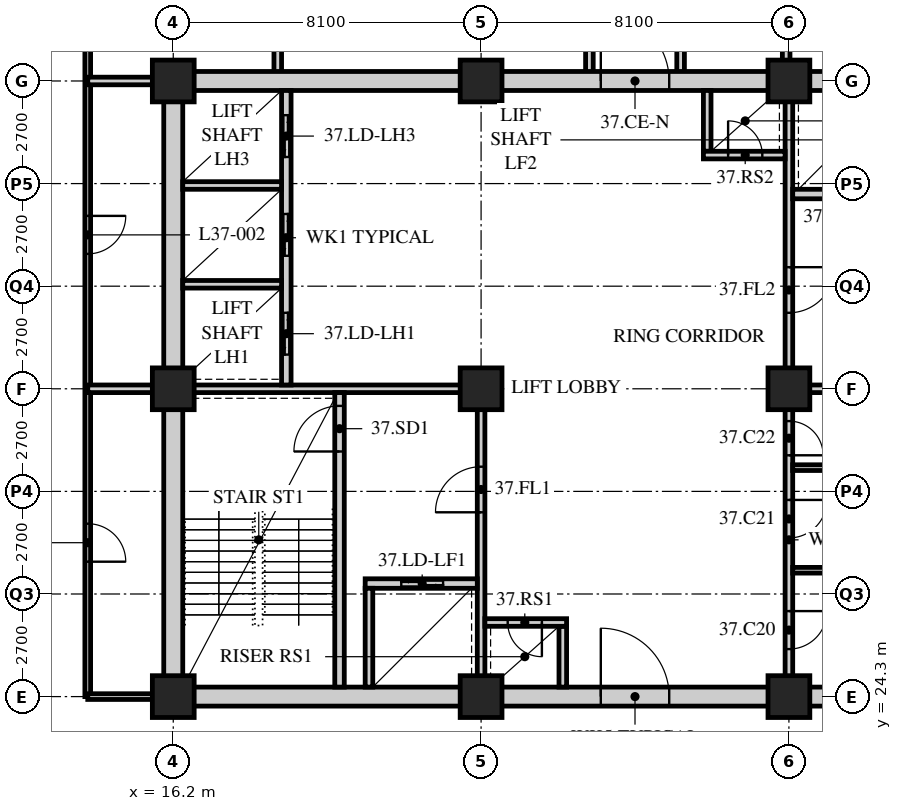
"""IFC4 building model, lengths in metres.
Left out: names, types, materials, properties, quantities, classifications, styles, units other than length and angle.
Written with IfcOpenShell. Run it as: python <this file> out.ifc"""

import sys

from ifc_helpers import new_model, si_unit, direction, frame, frame_2d, origin, origin_2d, place, context, subcontext, project, spatial, rectangle, hollow_rectangle, extrude, element, fill, save


model = new_model("IFC4")
c1 = context("Model", 3, precision=1e-05, world=origin(), true_north=direction((0.0, 1.0)))
c2 = subcontext(c1, "Body", "Model", "MODEL_VIEW")
j1 = project(units=[si_unit("LENGTHUNIT", "METRE"), si_unit("PLANEANGLEUNIT", "RADIAN")], contexts=[c1])
p1 = place(None, origin())
s1 = spatial("IfcSite", under=j1, at=p1, CompositionType="ELEMENT")
p2 = place(p1, origin())
s2 = spatial("IfcBuilding", under=s1, at=p2, CompositionType="ELEMENT")
p3 = place(p2, frame((0.0, 0.0, 144.2)))
s3 = spatial("IfcBuildingStorey", under=s2, at=p3, CompositionType="ELEMENT", Elevation=144.2)
for number, where, z_axis, x_axis in (
    (1, (16.2, 24.3, 0.0), (0.0, 0.0, 1.0), (1.0, 0.0, 0.0)),
    (2, (16.2, 32.4, 0.0), (0.0, 0.0, 1.0), (1.0, 0.0, 0.0)),
    (3, (16.2, 40.5, 0.0), (0.0, 0.0, 1.0), (1.0, 0.0, 0.0)),
    (4, (24.3, 24.3, 0.0), (0.0, 0.0, 1.0), (1.0, 0.0, 0.0)),
    (5, (24.3, 32.4, 0.0), (0.0, 0.0, 1.0), (1.0, 0.0, 0.0)),
    (6, (24.3, 40.5, 0.0), (0.0, 0.0, 1.0), (1.0, 0.0, 0.0)),
    (7, (32.4, 24.3, 0.0), (0.0, 0.0, 1.0), (1.0, 0.0, 0.0)),
    (8, (32.4, 32.4, 0.0), (0.0, 0.0, 1.0), (1.0, 0.0, 0.0)),
    (9, (32.4, 40.5, 0.0), (0.0, 0.0, 1.0), (1.0, 0.0, 0.0)),
):
    element("IfcColumn", number, at=place(p3, frame(where, z_axis=z_axis, x_axis=x_axis)), inside=s3, PredefinedType="COLUMN", context=c2, shape_type="SweptSolid", body=[
        extrude(hollow_rectangle(XDim=1.1, YDim=1.1, WallThickness=0.1, at=origin_2d()), origin(), (0.0, 0.0, 1.0), 3.4),
    ])
p4 = place(p3, frame((13.95, 44.1, 0.0), z_axis=(0.0, 0.0, 1.0), x_axis=(0.0, -1.0, 0.0)))
e10 = element("IfcWall", 10, at=p4, inside=s3, PredefinedType="PARTITIONING", context=c2, shape_type="SweptSolid", body=[
    extrude(rectangle(XDim=19.8, YDim=0.15, at=frame_2d((9.9, 0.0))), origin(), (0.0, 0.0, 1.0), 3.19),
])
p5 = place(p4, frame((15.25, 0.0, 0.0)))
e11 = element("IfcOpeningElement", 11, at=p5, cuts=e10, PredefinedType="OPENING", context=c2, shape_type="SweptSolid", body=[
    extrude(rectangle(XDim=1.0, YDim=2.1, at=frame_2d((0.5, 1.05))), frame((0.0, 0.085, 0.0), z_axis=(0.0, -1.0, 0.0), x_axis=(1.0, 0.0, 0.0)), (0.0, 0.0, 1.0), 0.17),
])
p6 = place(p4, frame((7.15, 0.0, 0.0)))
e12 = element("IfcOpeningElement", 12, at=p6, cuts=e10, PredefinedType="OPENING", context=c2, shape_type="SweptSolid", body=[
    extrude(rectangle(XDim=1.0, YDim=2.1, at=frame_2d((0.5, 1.05))), frame((0.0, 0.085, 0.0), z_axis=(0.0, -1.0, 0.0), x_axis=(1.0, 0.0, 0.0)), (0.0, 0.0, 1.0), 0.17),
])
p7 = place(p3, frame((13.95, 24.3, 0.0), z_axis=(0.0, 0.0, 1.0), x_axis=(1.0, 0.0, 0.0)))
e13 = element("IfcWall", 13, at=p7, inside=s3, PredefinedType="PARTITIONING", context=c2, shape_type="SweptSolid", body=[
    extrude(rectangle(XDim=2.05, YDim=0.15, at=frame_2d((1.025, 0.0))), origin(), (0.0, 0.0, 1.0), 3.19),
])
p8 = place(p3, frame((13.95, 32.4, 0.0), z_axis=(0.0, 0.0, 1.0), x_axis=(1.0, 0.0, 0.0)))
e14 = element("IfcWall", 14, at=p8, inside=s3, PredefinedType="SOLIDWALL", context=c2, shape_type="SweptSolid", body=[
    extrude(rectangle(XDim=2.25, YDim=0.2, at=frame_2d((1.125, 0.0))), origin(), (0.0, 0.0, 1.0), 3.19),
])
p9 = place(p3, frame((18.95, 44.1, 0.0), z_axis=(0.0, 0.0, 1.0), x_axis=(0.0, -1.0, 0.0)))
e15 = element("IfcWall", 15, at=p9, inside=s3, PredefinedType="SOLIDWALL", context=c2, shape_type="SweptSolid", body=[
    extrude(rectangle(XDim=3.6, YDim=0.2, at=frame_2d((1.8, 0.0))), origin(), (0.0, 0.0, 1.0), 3.19),
])
p10 = place(p3, frame((32.328, 44.1, 0.0), z_axis=(0.0, 0.0, 1.0), x_axis=(0.0, -1.0, 0.0)))
e16 = element("IfcWall", 16, at=p10, inside=s3, PredefinedType="SOLIDWALL", context=c2, shape_type="SweptSolid", body=[
    extrude(rectangle(XDim=3.6, YDim=0.2, at=frame_2d((1.8, 0.0))), origin(), (0.0, 0.0, 1.0), 2.42),
])
for number, where, z_axis, x_axis in (
    (17, (27.15, 40.5, 0.0), (0.0, 0.0, 1.0), (0.0, 1.0, 0.0)),
    (18, (29.55, 40.5, 0.0), (0.0, 0.0, 1.0), (0.0, 1.0, 0.0)),
):
    element("IfcWall", number, at=place(p3, frame(where, z_axis=z_axis, x_axis=x_axis)), inside=s3, PredefinedType="SOLIDWALL", context=c2, shape_type="SweptSolid", body=[
        extrude(rectangle(XDim=3.6, YDim=0.2, at=frame_2d((1.8, 0.0))), origin(), (0.0, 0.0, 1.0), 3.19),
    ])
p11 = place(p3, frame((13.95, 40.5, 0.0), z_axis=(0.0, 0.0, 1.0), x_axis=(1.0, 0.0, 0.0)))
e19 = element("IfcWall", 19, at=p11, inside=s3, PredefinedType="SOLIDWALL", context=c2, shape_type="SweptSolid", body=[
    extrude(rectangle(XDim=2.25, YDim=0.2, at=frame_2d((1.125, 0.0))), origin(), (0.0, 0.0, 1.0), 3.19),
])
p12 = place(p3, frame((15.95, 24.3, 0.0), z_axis=(0.0, 0.0, 1.0), x_axis=(1.0, 0.0, 0.0)))
e20 = element("IfcWall", 20, at=p12, inside=s3, PredefinedType="SOLIDWALL", context=c2, shape_type="SweptSolid", body=[
    extrude(rectangle(XDim=24.8, YDim=0.5, at=frame_2d((12.4, 0.0))), origin(), (0.0, 0.0, 1.0), 2.42),
])
p13 = place(p12, frame((11.5, 0.0, 0.0)))
e21 = element("IfcOpeningElement", 21, at=p13, cuts=e20, PredefinedType="OPENING", context=c2, shape_type="SweptSolid", body=[
    extrude(rectangle(XDim=1.8, YDim=2.4, at=frame_2d((0.9, 1.2))), frame((0.0, 0.26, 0.0), z_axis=(0.0, -1.0, 0.0), x_axis=(1.0, 0.0, 0.0)), (0.0, 0.0, 1.0), 0.52),
])
p14 = place(p3, frame((15.95, 40.5, 0.0), z_axis=(0.0, 0.0, 1.0), x_axis=(1.0, 0.0, 0.0)))
e22 = element("IfcWall", 22, at=p14, inside=s3, PredefinedType="SOLIDWALL", context=c2, shape_type="SweptSolid", body=[
    extrude(rectangle(XDim=24.8, YDim=0.5, at=frame_2d((12.4, 0.0))), origin(), (0.0, 0.0, 1.0), 2.42),
])
p15 = place(p14, frame((11.5, 0.0, 0.0)))
e23 = element("IfcOpeningElement", 23, at=p15, cuts=e22, PredefinedType="OPENING", context=c2, shape_type="SweptSolid", body=[
    extrude(rectangle(XDim=1.8, YDim=2.4, at=frame_2d((0.9, 1.2))), frame((0.0, 0.26, 0.0), z_axis=(0.0, -1.0, 0.0), x_axis=(1.0, 0.0, 0.0)), (0.0, 0.0, 1.0), 0.52),
])
p16 = place(p3, frame((16.2, 24.55, 0.0), z_axis=(0.0, 0.0, 1.0), x_axis=(0.0, 1.0, 0.0)))
e24 = element("IfcWall", 24, at=p16, inside=s3, PredefinedType="SOLIDWALL", context=c2, shape_type="SweptSolid", body=[
    extrude(rectangle(XDim=15.7, YDim=0.5, at=frame_2d((7.85, 0.0))), origin(), (0.0, 0.0, 1.0), 2.42),
])
p17 = place(p3, frame((16.45, 32.4, 0.0), z_axis=(0.0, 0.0, 1.0), x_axis=(1.0, 0.0, 0.0)))
e25 = element("IfcWall", 25, at=p17, inside=s3, PredefinedType="SOLIDWALL", context=c2, shape_type="SweptSolid", body=[
    extrude(rectangle(XDim=7.95, YDim=0.2, at=frame_2d((3.975, 0.0))), origin(), (0.0, 0.0, 1.0), 2.578),
])
p18 = place(p3, frame((24.3, 24.55, 0.0), z_axis=(0.0, 0.0, 1.0), x_axis=(0.0, 1.0, 0.0)))
e26 = element("IfcWall", 26, at=p18, inside=s3, PredefinedType="SOLIDWALL", context=c2, shape_type="SweptSolid", body=[
    extrude(rectangle(XDim=7.75, YDim=0.2, at=frame_2d((3.875, 0.0))), origin(), (0.0, 0.0, 1.0), 2.578),
])
p19 = place(p18, frame((4.6, 0.0, 0.0)))
e27 = element("IfcOpeningElement", 27, at=p19, cuts=e26, PredefinedType="OPENING", context=c2, shape_type="SweptSolid", body=[
    extrude(rectangle(XDim=1.2, YDim=2.1, at=frame_2d((0.6, 1.05))), frame((0.0, 0.11, 0.0), z_axis=(0.0, -1.0, 0.0), x_axis=(1.0, 0.0, 0.0)), (0.0, 0.0, 1.0), 0.22),
])
p20 = place(p3, frame((20.575, 24.55, 0.0), z_axis=(0.0, 0.0, 1.0), x_axis=(0.0, 1.0, 0.0)))
e28 = element("IfcWall", 28, at=p20, inside=s3, PredefinedType="SOLIDWALL", context=c2, shape_type="SweptSolid", body=[
    extrude(rectangle(XDim=7.75, YDim=0.25, at=frame_2d((3.875, 0.0))), origin(), (0.0, 0.0, 1.0), 3.19),
])
p21 = place(p20, frame((6.2, 0.0, 0.0)))
e29 = element("IfcOpeningElement", 29, at=p21, cuts=e28, PredefinedType="OPENING", context=c2, shape_type="SweptSolid", body=[
    extrude(rectangle(XDim=1.2, YDim=2.1, at=frame_2d((0.6, 1.05))), frame((0.0, 0.135, 0.0), z_axis=(0.0, -1.0, 0.0), x_axis=(1.0, 0.0, 0.0)), (0.0, 0.0, 1.0), 0.27),
])
p22 = place(p3, frame((21.25, 27.275, 0.0), z_axis=(0.0, 0.0, 1.0), x_axis=(1.0, 0.0, 0.0)))
e30 = element("IfcWall", 30, at=p22, inside=s3, PredefinedType="SOLIDWALL", context=c2, shape_type="SweptSolid", body=[
    extrude(rectangle(XDim=2.95, YDim=0.25, at=frame_2d((1.475, 0.0))), origin(), (0.0, 0.0, 1.0), 3.19),
])
p23 = place(p22, frame((0.95, 0.0, 0.0)))
e31 = element("IfcOpeningElement", 31, at=p23, cuts=e30, PredefinedType="OPENING", context=c2, shape_type="SweptSolid", body=[
    extrude(rectangle(XDim=1.1, YDim=2.4, at=frame_2d((0.55, 1.2))), frame((0.0, 0.135, 0.0), z_axis=(0.0, -1.0, 0.0), x_axis=(1.0, 0.0, 0.0)), (0.0, 0.0, 1.0), 0.27),
])
p24 = place(p3, frame((21.35, 24.55, 0.0), z_axis=(0.0, 0.0, 1.0), x_axis=(0.0, 1.0, 0.0)))
e32 = element("IfcWall", 32, at=p24, inside=s3, PredefinedType="SOLIDWALL", context=c2, shape_type="SweptSolid", body=[
    extrude(rectangle(XDim=2.6, YDim=0.2, at=frame_2d((1.3, 0.0))), origin(), (0.0, 0.0, 1.0), 3.19),
])
p25 = place(p3, frame((19.175, 32.5, 0.0), z_axis=(0.0, 0.0, 1.0), x_axis=(0.0, 1.0, 0.0)))
e33 = element("IfcWall", 33, at=p25, inside=s3, PredefinedType="SOLIDWALL", context=c2, shape_type="SweptSolid", body=[
    extrude(rectangle(XDim=7.75, YDim=0.25, at=frame_2d((3.875, 0.0))), origin(), (0.0, 0.0, 1.0), 3.19),
])
p26 = place(p25, frame((0.8, 0.0, 0.0)))
e34 = element("IfcOpeningElement", 34, at=p26, cuts=e33, PredefinedType="OPENING", context=c2, shape_type="SweptSolid", body=[
    extrude(rectangle(XDim=1.1, YDim=2.4, at=frame_2d((0.55, 1.2))), frame((0.0, 0.135, 0.0), z_axis=(0.0, -1.0, 0.0), x_axis=(1.0, 0.0, 0.0)), (0.0, 0.0, 1.0), 0.27),
])
p27 = place(p25, frame((3.4, 0.0, 0.0)))
e35 = element("IfcOpeningElement", 35, at=p27, cuts=e33, PredefinedType="OPENING", context=c2, shape_type="SweptSolid", body=[
    extrude(rectangle(XDim=1.1, YDim=2.4, at=frame_2d((0.55, 1.2))), frame((0.0, 0.135, 0.0), z_axis=(0.0, -1.0, 0.0), x_axis=(1.0, 0.0, 0.0)), (0.0, 0.0, 1.0), 0.27),
])
p28 = place(p25, frame((6.0, 0.0, 0.0)))
e36 = element("IfcOpeningElement", 36, at=p28, cuts=e33, PredefinedType="OPENING", context=c2, shape_type="SweptSolid", body=[
    extrude(rectangle(XDim=1.1, YDim=2.4, at=frame_2d((0.55, 1.2))), frame((0.0, 0.135, 0.0), z_axis=(0.0, -1.0, 0.0), x_axis=(1.0, 0.0, 0.0)), (0.0, 0.0, 1.0), 0.27),
])
for number, where, z_axis, x_axis in (
    (37, (16.45, 35.15, 0.0), (0.0, 0.0, 1.0), (1.0, 0.0, 0.0)),
    (38, (16.45, 37.75, 0.0), (0.0, 0.0, 1.0), (1.0, 0.0, 0.0)),
):
    element("IfcWall", number, at=place(p3, frame(where, z_axis=z_axis, x_axis=x_axis)), inside=s3, PredefinedType="SOLIDWALL", context=c2, shape_type="SweptSolid", body=[
        extrude(rectangle(XDim=2.6, YDim=0.2, at=frame_2d((1.3, 0.0))), origin(), (0.0, 0.0, 1.0), 3.19),
    ])
p29 = place(p3, frame((26.45, 24.55, 0.0), z_axis=(0.0, 0.0, 1.0), x_axis=(0.0, 1.0, 0.0)))
e39 = element("IfcWall", 39, at=p29, inside=s3, PredefinedType="SOLIDWALL", context=c2, shape_type="SweptSolid", body=[
    extrude(rectangle(XDim=1.6, YDim=0.2, at=frame_2d((0.8, 0.0))), origin(), (0.0, 0.0, 1.0), 3.19),
])
p30 = place(p3, frame((24.4, 26.25, 0.0), z_axis=(0.0, 0.0, 1.0), x_axis=(1.0, 0.0, 0.0)))
e40 = element("IfcWall", 40, at=p30, inside=s3, PredefinedType="SOLIDWALL", context=c2, shape_type="SweptSolid", body=[
    extrude(rectangle(XDim=2.15, YDim=0.2, at=frame_2d((1.075, 0.0))), origin(), (0.0, 0.0, 1.0), 3.19),
])
p31 = place(p30, frame((0.6, 0.0, 0.0)))
e41 = element("IfcOpeningElement", 41, at=p31, cuts=e40, PredefinedType="OPENING", context=c2, shape_type="SweptSolid", body=[
    extrude(rectangle(XDim=0.9, YDim=2.1, at=frame_2d((0.45, 1.05))), frame((0.0, 0.11, 0.0), z_axis=(0.0, -1.0, 0.0), x_axis=(1.0, 0.0, 0.0)), (0.0, 0.0, 1.0), 0.22),
])
p32 = place(p3, frame((32.3, 32.4, 0.0), z_axis=(0.0, 0.0, 1.0), x_axis=(1.0, 0.0, 0.0)))
e42 = element("IfcWall", 42, at=p32, inside=s3, PredefinedType="SOLIDWALL", context=c2, shape_type="SweptSolid", body=[
    extrude(rectangle(XDim=7.95, YDim=0.2, at=frame_2d((3.975, 0.0))), origin(), (0.0, 0.0, 1.0), 2.578),
])
p33 = place(p3, frame((32.4, 32.5, 0.0), z_axis=(0.0, 0.0, 1.0), x_axis=(0.0, 1.0, 0.0)))
e43 = element("IfcWall", 43, at=p33, inside=s3, PredefinedType="SOLIDWALL", context=c2, shape_type="SweptSolid", body=[
    extrude(rectangle(XDim=7.75, YDim=0.2, at=frame_2d((3.875, 0.0))), origin(), (0.0, 0.0, 1.0), 2.578),
])
p34 = place(p33, frame((1.9, 0.0, 0.0)))
e44 = element("IfcOpeningElement", 44, at=p34, cuts=e43, PredefinedType="OPENING", context=c2, shape_type="SweptSolid", body=[
    extrude(rectangle(XDim=1.2, YDim=2.1, at=frame_2d((0.6, 1.05))), frame((0.0, 0.11, 0.0), z_axis=(0.0, -1.0, 0.0), x_axis=(1.0, 0.0, 0.0)), (0.0, 0.0, 1.0), 0.22),
])
p35 = place(p3, frame((32.5, 37.525, 0.0), z_axis=(0.0, 0.0, 1.0), x_axis=(1.0, 0.0, 0.0)))
e45 = element("IfcWall", 45, at=p35, inside=s3, PredefinedType="SOLIDWALL", context=c2, shape_type="SweptSolid", body=[
    extrude(rectangle(XDim=2.95, YDim=0.25, at=frame_2d((1.475, 0.0))), origin(), (0.0, 0.0, 1.0), 3.19),
])
p36 = place(p35, frame((0.9, 0.0, 0.0)))
e46 = element("IfcOpeningElement", 46, at=p36, cuts=e45, PredefinedType="OPENING", context=c2, shape_type="SweptSolid", body=[
    extrude(rectangle(XDim=1.1, YDim=2.4, at=frame_2d((0.55, 1.2))), frame((0.0, 0.135, 0.0), z_axis=(0.0, -1.0, 0.0), x_axis=(1.0, 0.0, 0.0)), (0.0, 0.0, 1.0), 0.27),
])
p37 = place(p3, frame((30.25, 38.65, 0.0), z_axis=(0.0, 0.0, 1.0), x_axis=(0.0, 1.0, 0.0)))
e47 = element("IfcWall", 47, at=p37, inside=s3, PredefinedType="SOLIDWALL", context=c2, shape_type="SweptSolid", body=[
    extrude(rectangle(XDim=1.6, YDim=0.2, at=frame_2d((0.8, 0.0))), origin(), (0.0, 0.0, 1.0), 3.19),
])
p38 = place(p3, frame((30.15, 38.55, 0.0), z_axis=(0.0, 0.0, 1.0), x_axis=(1.0, 0.0, 0.0)))
e48 = element("IfcWall", 48, at=p38, inside=s3, PredefinedType="SOLIDWALL", context=c2, shape_type="SweptSolid", body=[
    extrude(rectangle(XDim=2.15, YDim=0.2, at=frame_2d((1.075, 0.0))), origin(), (0.0, 0.0, 1.0), 3.19),
])
p39 = place(p38, frame((0.65, 0.0, 0.0)))
e49 = element("IfcOpeningElement", 49, at=p39, cuts=e48, PredefinedType="OPENING", context=c2, shape_type="SweptSolid", body=[
    extrude(rectangle(XDim=0.9, YDim=2.1, at=frame_2d((0.45, 1.05))), frame((0.0, 0.11, 0.0), z_axis=(0.0, -1.0, 0.0), x_axis=(1.0, 0.0, 0.0)), (0.0, 0.0, 1.0), 0.22),
])
p40 = place(p3, frame((32.4, 24.55, 0.0), z_axis=(0.0, 0.0, 1.0), x_axis=(0.0, 1.0, 0.0)))
e50 = element("IfcWall", 50, at=p40, inside=s3, PredefinedType="PARTITIONING", context=c2, shape_type="SweptSolid", body=[
    extrude(rectangle(XDim=7.75, YDim=0.2, at=frame_2d((3.875, 0.0))), origin(), (0.0, 0.0, 1.0), 2.578),
])
p41 = place(p40, frame((1.0, 0.0, 0.0)))
e51 = element("IfcOpeningElement", 51, at=p41, cuts=e50, PredefinedType="OPENING", context=c2, shape_type="SweptSolid", body=[
    extrude(rectangle(XDim=1.0, YDim=2.1, at=frame_2d((0.5, 1.05))), frame((0.0, 0.11, 0.0), z_axis=(0.0, -1.0, 0.0), x_axis=(1.0, 0.0, 0.0)), (0.0, 0.0, 1.0), 0.22),
])
p42 = place(p40, frame((3.925, 0.0, 0.0)))
e52 = element("IfcOpeningElement", 52, at=p42, cuts=e50, PredefinedType="OPENING", context=c2, shape_type="SweptSolid", body=[
    extrude(rectangle(XDim=1.0, YDim=2.1, at=frame_2d((0.5, 1.05))), frame((0.0, 0.11, 0.0), z_axis=(0.0, -1.0, 0.0), x_axis=(1.0, 0.0, 0.0)), (0.0, 0.0, 1.0), 0.22),
])
p43 = place(p40, frame((6.1, 0.0, 0.0)))
e53 = element("IfcOpeningElement", 53, at=p43, cuts=e50, PredefinedType="OPENING", context=c2, shape_type="SweptSolid", body=[
    extrude(rectangle(XDim=0.9, YDim=2.1, at=frame_2d((0.45, 1.05))), frame((0.0, 0.11, 0.0), z_axis=(0.0, -1.0, 0.0), x_axis=(1.0, 0.0, 0.0)), (0.0, 0.0, 1.0), 0.22),
])
for number, where, z_axis, x_axis in (
    (54, (32.5, 27.625, 0.0), (0.0, 0.0, 1.0), (1.0, 0.0, 0.0)),
    (55, (32.5, 30.325, 0.0), (0.0, 0.0, 1.0), (1.0, 0.0, 0.0)),
):
    element("IfcWall", number, at=place(p3, frame(where, z_axis=z_axis, x_axis=x_axis)), inside=s3, PredefinedType="PARTITIONING", context=c2, shape_type="SweptSolid", body=[
        extrude(rectangle(XDim=4.9, YDim=0.15, at=frame_2d((2.45, 0.0))), origin(), (0.0, 0.0, 1.0), 3.19),
    ])
p44 = place(p5, origin())
e56 = element("IfcDoor", 56, at=p44, inside=s3, OperationType="SINGLE_SWING_RIGHT", PredefinedType="DOOR", context=c2, shape_type="SweptSolid", body=[
    extrude(rectangle(XDim=1.0, YDim=2.1, at=frame_2d((0.5, 1.05))), frame((0.0, 0.025, 0.0), z_axis=(0.0, -1.0, 0.0), x_axis=(1.0, 0.0, 0.0)), (0.0, 0.0, 1.0), 0.05),
])
fill(e11, e56)
p45 = place(p6, origin())
e57 = element("IfcDoor", 57, at=p45, inside=s3, OperationType="SINGLE_SWING_LEFT", PredefinedType="DOOR", context=c2, shape_type="SweptSolid", body=[
    extrude(rectangle(XDim=1.0, YDim=2.1, at=frame_2d((0.5, 1.05))), frame((0.0, 0.025, 0.0), z_axis=(0.0, -1.0, 0.0), x_axis=(1.0, 0.0, 0.0)), (0.0, 0.0, 1.0), 0.05),
])
fill(e12, e57)
p46 = place(p41, origin())
e58 = element("IfcDoor", 58, at=p46, inside=s3, OperationType="SINGLE_SWING_LEFT", PredefinedType="DOOR", context=c2, shape_type="SweptSolid", body=[
    extrude(rectangle(XDim=1.0, YDim=2.1, at=frame_2d((0.5, 1.05))), frame((0.0, 0.025, 0.0), z_axis=(0.0, -1.0, 0.0), x_axis=(1.0, 0.0, 0.0)), (0.0, 0.0, 1.0), 0.05),
])
fill(e51, e58)
p47 = place(p42, origin())
e59 = element("IfcDoor", 59, at=p47, inside=s3, OperationType="SINGLE_SWING_LEFT", PredefinedType="DOOR", context=c2, shape_type="SweptSolid", body=[
    extrude(rectangle(XDim=1.0, YDim=2.1, at=frame_2d((0.5, 1.05))), frame((0.0, 0.025, 0.0), z_axis=(0.0, -1.0, 0.0), x_axis=(1.0, 0.0, 0.0)), (0.0, 0.0, 1.0), 0.05),
])
fill(e52, e59)
p48 = place(p43, origin())
e60 = element("IfcDoor", 60, at=p48, inside=s3, OperationType="SINGLE_SWING_RIGHT", PredefinedType="DOOR", context=c2, shape_type="SweptSolid", body=[
    extrude(rectangle(XDim=0.9, YDim=2.1, at=frame_2d((0.45, 1.05))), frame((0.0, 0.025, 0.0), z_axis=(0.0, -1.0, 0.0), x_axis=(1.0, 0.0, 0.0)), (0.0, 0.0, 1.0), 0.05),
])
fill(e53, e60)
p49 = place(p21, origin())
e61 = element("IfcDoor", 61, at=p49, inside=s3, OperationType="SINGLE_SWING_LEFT", PredefinedType="DOOR", context=c2, shape_type="SweptSolid", body=[
    extrude(rectangle(XDim=1.2, YDim=2.1, at=frame_2d((0.6, 1.05))), frame((0.0, 0.025, 0.0), z_axis=(0.0, -1.0, 0.0), x_axis=(1.0, 0.0, 0.0)), (0.0, 0.0, 1.0), 0.05),
])
fill(e29, e61)
p50 = place(p19, origin())
e62 = element("IfcDoor", 62, at=p50, inside=s3, OperationType="SINGLE_SWING_LEFT", PredefinedType="DOOR", context=c2, shape_type="SweptSolid", body=[
    extrude(rectangle(XDim=1.2, YDim=2.1, at=frame_2d((0.6, 1.05))), frame((0.0, 0.025, 0.0), z_axis=(0.0, -1.0, 0.0), x_axis=(1.0, 0.0, 0.0)), (0.0, 0.0, 1.0), 0.05),
])
fill(e27, e62)
p51 = place(p31, origin())
e63 = element("IfcDoor", 63, at=p51, inside=s3, OperationType="SINGLE_SWING_LEFT", PredefinedType="DOOR", context=c2, shape_type="SweptSolid", body=[
    extrude(rectangle(XDim=0.9, YDim=2.1, at=frame_2d((0.45, 1.05))), frame((0.0, 0.025, 0.0), z_axis=(0.0, -1.0, 0.0), x_axis=(1.0, 0.0, 0.0)), (0.0, 0.0, 1.0), 0.05),
])
fill(e41, e63)
p52 = place(p34, origin())
e64 = element("IfcDoor", 64, at=p52, inside=s3, OperationType="SINGLE_SWING_LEFT", PredefinedType="DOOR", context=c2, shape_type="SweptSolid", body=[
    extrude(rectangle(XDim=1.2, YDim=2.1, at=frame_2d((0.6, 1.05))), frame((0.0, 0.025, 0.0), z_axis=(0.0, -1.0, 0.0), x_axis=(1.0, 0.0, 0.0)), (0.0, 0.0, 1.0), 0.05),
])
fill(e44, e64)
p53 = place(p39, origin())
e65 = element("IfcDoor", 65, at=p53, inside=s3, OperationType="SINGLE_SWING_LEFT", PredefinedType="DOOR", context=c2, shape_type="SweptSolid", body=[
    extrude(rectangle(XDim=0.9, YDim=2.1, at=frame_2d((0.45, 1.05))), frame((0.0, 0.025, 0.0), z_axis=(0.0, -1.0, 0.0), x_axis=(1.0, 0.0, 0.0)), (0.0, 0.0, 1.0), 0.05),
])
fill(e49, e65)
p54 = place(p26, origin())
e66 = element("IfcDoor", 66, at=p54, inside=s3, OperationType="DOUBLE_DOOR_SLIDING", PredefinedType="DOOR", context=c2, shape_type="SweptSolid", body=[
    extrude(rectangle(XDim=1.1, YDim=2.4, at=frame_2d((0.55, 1.2))), frame((0.0, 0.025, 0.0), z_axis=(0.0, -1.0, 0.0), x_axis=(1.0, 0.0, 0.0)), (0.0, 0.0, 1.0), 0.05),
])
fill(e34, e66)
p55 = place(p27, origin())
e67 = element("IfcDoor", 67, at=p55, inside=s3, OperationType="DOUBLE_DOOR_SLIDING", PredefinedType="DOOR", context=c2, shape_type="SweptSolid", body=[
    extrude(rectangle(XDim=1.1, YDim=2.4, at=frame_2d((0.55, 1.2))), frame((0.0, 0.025, 0.0), z_axis=(0.0, -1.0, 0.0), x_axis=(1.0, 0.0, 0.0)), (0.0, 0.0, 1.0), 0.05),
])
fill(e35, e67)
p56 = place(p28, origin())
e68 = element("IfcDoor", 68, at=p56, inside=s3, OperationType="DOUBLE_DOOR_SLIDING", PredefinedType="DOOR", context=c2, shape_type="SweptSolid", body=[
    extrude(rectangle(XDim=1.1, YDim=2.4, at=frame_2d((0.55, 1.2))), frame((0.0, 0.025, 0.0), z_axis=(0.0, -1.0, 0.0), x_axis=(1.0, 0.0, 0.0)), (0.0, 0.0, 1.0), 0.05),
])
fill(e36, e68)
p57 = place(p23, origin())
e69 = element("IfcDoor", 69, at=p57, inside=s3, OperationType="DOUBLE_DOOR_SLIDING", PredefinedType="DOOR", context=c2, shape_type="SweptSolid", body=[
    extrude(rectangle(XDim=1.1, YDim=2.4, at=frame_2d((0.55, 1.2))), frame((0.0, 0.025, 0.0), z_axis=(0.0, -1.0, 0.0), x_axis=(1.0, 0.0, 0.0)), (0.0, 0.0, 1.0), 0.05),
])
fill(e31, e69)
p58 = place(p13, origin())
e70 = element("IfcDoor", 70, at=p58, inside=s3, OperationType="DOUBLE_DOOR_SINGLE_SWING", PredefinedType="DOOR", context=c2, shape_type="SweptSolid", body=[
    extrude(rectangle(XDim=1.8, YDim=2.4, at=frame_2d((0.9, 1.2))), frame((0.0, 0.025, 0.0), z_axis=(0.0, -1.0, 0.0), x_axis=(1.0, 0.0, 0.0)), (0.0, 0.0, 1.0), 0.05),
])
fill(e21, e70)
p59 = place(p15, origin())
e71 = element("IfcDoor", 71, at=p59, inside=s3, OperationType="DOUBLE_DOOR_SINGLE_SWING", PredefinedType="DOOR", context=c2, shape_type="SweptSolid", body=[
    extrude(rectangle(XDim=1.8, YDim=2.4, at=frame_2d((0.9, 1.2))), frame((0.0, 0.025, 0.0), z_axis=(0.0, -1.0, 0.0), x_axis=(1.0, 0.0, 0.0)), (0.0, 0.0, 1.0), 0.05),
])
fill(e23, e71)
save(model, sys.argv[1])
